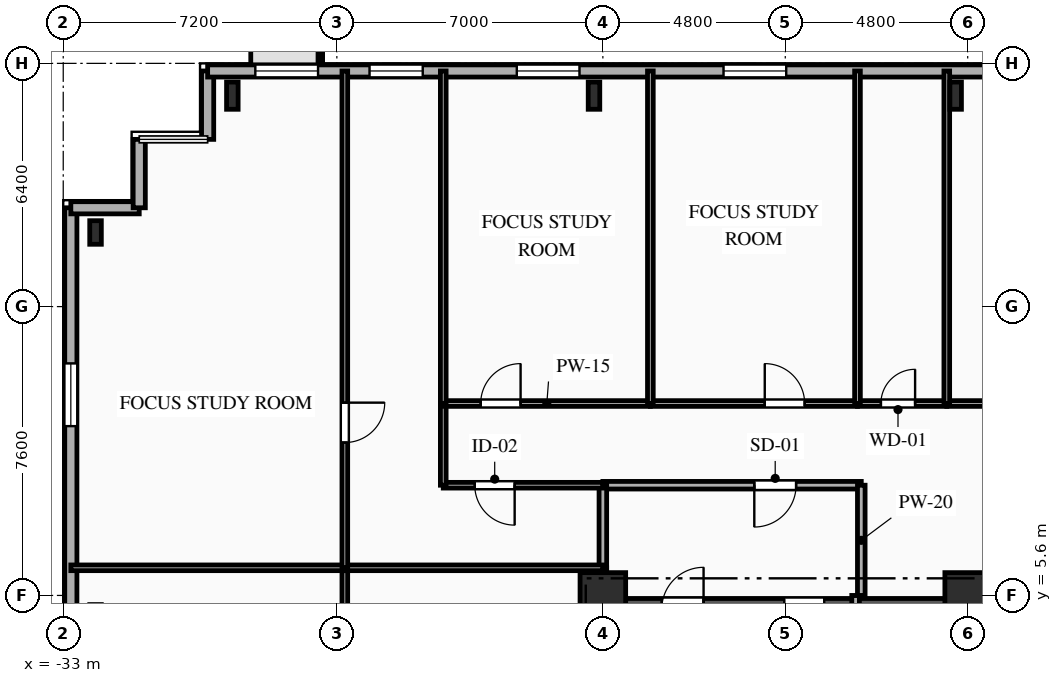
"""IFC4 building model, lengths in metres.
Left out: names, types, materials, properties, quantities, classifications, styles, units other than length and angle.
Written with IfcOpenShell. Run it as: python <this file> out.ifc"""

import sys

from ifc_helpers import new_model, si_unit, direction, frame, frame_2d, origin, origin_2d, place, context, subcontext, project, spatial, rectangle, i_section, extrude, element, fill, save


model = new_model("IFC4")
c1 = context("Model", 3, precision=1e-05, world=origin(), true_north=direction((0.0, 1.0)))
c2 = subcontext(c1, "Body", "Model", "MODEL_VIEW")
j1 = project(units=[si_unit("LENGTHUNIT", "METRE"), si_unit("PLANEANGLEUNIT", "RADIAN")], contexts=[c1])
p1 = place(None, origin())
s1 = spatial("IfcSite", under=j1, at=p1, CompositionType="ELEMENT")
p2 = place(p1, origin())
s2 = spatial("IfcBuilding", under=s1, at=p2, CompositionType="ELEMENT")
p3 = place(p2, frame((0.0, 0.0, 63.85)))
s3 = spatial("IfcBuildingStorey", under=s2, at=p3, CompositionType="ELEMENT", Elevation=63.85)
for number, where, z_axis, x_axis in (
    (1, (-18.8, 5.6, 0.0), (0.0, 0.0, 1.0), (1.0, 0.0, 0.0)),
    (2, (-9.2, 5.6, 0.0), (0.0, 0.0, 1.0), (1.0, 0.0, 0.0)),
):
    element("IfcColumn", number, at=place(p3, frame(where, z_axis=z_axis, x_axis=x_axis)), inside=s3, PredefinedType="COLUMN", context=c2, shape_type="SweptSolid", body=[
        extrude(rectangle(XDim=1.2, YDim=1.2, at=origin_2d()), origin(), (0.0, 0.0, 1.0), 3.35),
    ])
for number, where, z_axis, x_axis in (
    (3, (-9.517, 18.75, 0.0), (0.0, 0.0, 1.0), (1.0, 0.0, 0.0)),
    (4, (-19.033, 18.75, 0.0), (0.0, 0.0, 1.0), (1.0, 0.0, 0.0)),
    (5, (-28.55, 18.75, 0.0), (0.0, 0.0, 1.0), (1.0, 0.0, 0.0)),
):
    element("IfcColumn", number, at=place(p3, frame(where, z_axis=z_axis, x_axis=x_axis)), inside=s3, PredefinedType="COLUMN", context=c2, shape_type="SweptSolid", body=[
        extrude(i_section(OverallWidth=0.304, OverallDepth=0.716, WebThickness=0.021, FlangeThickness=0.04, FilletRadius=0.027, at=origin_2d()), origin(), (0.0, 0.0, 1.0), 3.35),
    ])
p4 = place(p3, frame((-32.15, 15.15, 0.0), z_axis=(0.0, 0.0, 1.0), x_axis=(1.0, 0.0, 0.0)))
e6 = element("IfcColumn", 6, at=p4, inside=s3, PredefinedType="COLUMN", context=c2, shape_type="SweptSolid", body=[
    extrude(i_section(OverallWidth=0.305, OverallDepth=0.62, WebThickness=0.021, FlangeThickness=0.04, FilletRadius=0.027, at=origin_2d()), origin(), (0.0, 0.0, 1.0), 3.35),
])
p5 = place(p3, frame((-32.8, -15.8, 0.0), z_axis=(0.0, 0.0, 1.0), x_axis=(0.0, 1.0, 0.0)))
e7 = element("IfcWall", 7, at=p5, inside=s3, PredefinedType="SOLIDWALL", context=c2, shape_type="SweptSolid", body=[
    extrude(rectangle(XDim=31.6, YDim=0.32, at=frame_2d((15.8, 0.0))), origin(), (0.0, 0.0, 1.0), 3.035),
])
p6 = place(p5, frame((4.175, 0.0, 0.85)))
e8 = element("IfcOpeningElement", 8, at=p6, cuts=e7, PredefinedType="OPENING", context=c2, shape_type="SweptSolid", body=[
    extrude(rectangle(XDim=1.65, YDim=1.85, at=frame_2d((0.825, 0.925))), frame((0.0, 0.17, 0.0), z_axis=(0.0, -1.0, 0.0), x_axis=(1.0, 0.0, 0.0)), (0.0, 0.0, 1.0), 0.34),
])
p7 = place(p5, frame((15.015, 0.0, 0.85)))
e9 = element("IfcOpeningElement", 9, at=p7, cuts=e7, PredefinedType="OPENING", context=c2, shape_type="SweptSolid", body=[
    extrude(rectangle(XDim=1.65, YDim=1.85, at=frame_2d((0.825, 0.925))), frame((0.0, 0.17, 0.0), z_axis=(0.0, -1.0, 0.0), x_axis=(1.0, 0.0, 0.0)), (0.0, 0.0, 1.0), 0.34),
])
p8 = place(p5, frame((25.855, 0.0, 0.85)))
e10 = element("IfcOpeningElement", 10, at=p8, cuts=e7, PredefinedType="OPENING", context=c2, shape_type="SweptSolid", body=[
    extrude(rectangle(XDim=1.65, YDim=1.85, at=frame_2d((0.825, 0.925))), frame((0.0, 0.17, 0.0), z_axis=(0.0, -1.0, 0.0), x_axis=(1.0, 0.0, 0.0)), (0.0, 0.0, 1.0), 0.34),
])
for number, where, z_axis, x_axis in (
    (11, (-32.8, 15.8, 0.0), (0.0, 0.0, 1.0), (1.0, 0.0, 0.0)),
    (12, (-31.0, 15.8, 0.0), (0.0, 0.0, 1.0), (0.0, 1.0, 0.0)),
):
    element("IfcWall", number, at=place(p3, frame(where, z_axis=z_axis, x_axis=x_axis)), inside=s3, PredefinedType="SOLIDWALL", context=c2, shape_type="SweptSolid", body=[
        extrude(rectangle(XDim=1.8, YDim=0.32, at=frame_2d((0.9, 0.0))), origin(), (0.0, 0.0, 1.0), 3.035),
    ])
p9 = place(p3, frame((-29.2, 17.6, 0.0), z_axis=(0.0, 0.0, 1.0), x_axis=(0.0, 1.0, 0.0)))
e13 = element("IfcWall", 13, at=p9, inside=s3, PredefinedType="SOLIDWALL", context=c2, shape_type="SweptSolid", body=[
    extrude(rectangle(XDim=1.8, YDim=0.32, at=frame_2d((0.9, 0.0))), origin(), (0.0, 0.0, 1.0), 3.035),
])
p10 = place(p3, frame((-29.2, 19.4, 0.0), z_axis=(0.0, 0.0, 1.0), x_axis=(1.0, 0.0, 0.0)))
e14 = element("IfcWall", 14, at=p10, inside=s3, PredefinedType="SOLIDWALL", context=c2, shape_type="SweptSolid", body=[
    extrude(rectangle(XDim=58.4, YDim=0.32, at=frame_2d((29.2, 0.0))), origin(), (0.0, 0.0, 1.0), 3.035),
])
p11 = place(p10, frame((1.255, 0.0, 0.85)))
e15 = element("IfcOpeningElement", 15, at=p11, cuts=e14, PredefinedType="OPENING", context=c2, shape_type="SweptSolid", body=[
    extrude(rectangle(XDim=1.65, YDim=1.85, at=frame_2d((0.825, 0.925))), frame((0.0, 0.17, 0.0), z_axis=(0.0, -1.0, 0.0), x_axis=(1.0, 0.0, 0.0)), (0.0, 0.0, 1.0), 0.34),
])
p12 = place(p10, frame((4.26, 0.0, 0.85)))
e16 = element("IfcOpeningElement", 16, at=p12, cuts=e14, PredefinedType="OPENING", context=c2, shape_type="SweptSolid", body=[
    extrude(rectangle(XDim=1.4, YDim=1.85, at=frame_2d((0.7, 0.925))), frame((0.0, 0.17, 0.0), z_axis=(0.0, -1.0, 0.0), x_axis=(1.0, 0.0, 0.0)), (0.0, 0.0, 1.0), 0.34),
])
p13 = place(p10, frame((8.135, 0.0, 0.85)))
e17 = element("IfcOpeningElement", 17, at=p13, cuts=e14, PredefinedType="OPENING", context=c2, shape_type="SweptSolid", body=[
    extrude(rectangle(XDim=1.65, YDim=1.85, at=frame_2d((0.825, 0.925))), frame((0.0, 0.17, 0.0), z_axis=(0.0, -1.0, 0.0), x_axis=(1.0, 0.0, 0.0)), (0.0, 0.0, 1.0), 0.34),
])
p14 = place(p10, frame((13.575, 0.0, 0.85)))
e18 = element("IfcOpeningElement", 18, at=p14, cuts=e14, PredefinedType="OPENING", context=c2, shape_type="SweptSolid", body=[
    extrude(rectangle(XDim=1.65, YDim=1.85, at=frame_2d((0.825, 0.925))), frame((0.0, 0.17, 0.0), z_axis=(0.0, -1.0, 0.0), x_axis=(1.0, 0.0, 0.0)), (0.0, 0.0, 1.0), 0.34),
])
p15 = place(p10, frame((23.28, 0.0, 0.85)))
e19 = element("IfcOpeningElement", 19, at=p15, cuts=e14, PredefinedType="OPENING", context=c2, shape_type="SweptSolid", body=[
    extrude(rectangle(XDim=1.6, YDim=1.85, at=frame_2d((0.8, 0.925))), frame((0.0, 0.17, 0.0), z_axis=(0.0, -1.0, 0.0), x_axis=(1.0, 0.0, 0.0)), (0.0, 0.0, 1.0), 0.34),
])
p16 = place(p10, frame((33.3, 0.0, 0.85)))
e20 = element("IfcOpeningElement", 20, at=p16, cuts=e14, PredefinedType="OPENING", context=c2, shape_type="SweptSolid", body=[
    extrude(rectangle(XDim=2.2, YDim=1.85, at=frame_2d((1.1, 0.925))), frame((0.0, 0.17, 0.0), z_axis=(0.0, -1.0, 0.0), x_axis=(1.0, 0.0, 0.0)), (0.0, 0.0, 1.0), 0.34),
])
p17 = place(p10, frame((42.335, 0.0, 0.85)))
e21 = element("IfcOpeningElement", 21, at=p17, cuts=e14, PredefinedType="OPENING", context=c2, shape_type="SweptSolid", body=[
    extrude(rectangle(XDim=1.65, YDim=1.85, at=frame_2d((0.825, 0.925))), frame((0.0, 0.17, 0.0), z_axis=(0.0, -1.0, 0.0), x_axis=(1.0, 0.0, 0.0)), (0.0, 0.0, 1.0), 0.34),
])
p18 = place(p10, frame((48.905, 0.0, 0.85)))
e22 = element("IfcOpeningElement", 22, at=p18, cuts=e14, PredefinedType="OPENING", context=c2, shape_type="SweptSolid", body=[
    extrude(rectangle(XDim=1.65, YDim=1.85, at=frame_2d((0.825, 0.925))), frame((0.0, 0.17, 0.0), z_axis=(0.0, -1.0, 0.0), x_axis=(1.0, 0.0, 0.0)), (0.0, 0.0, 1.0), 0.34),
])
p19 = place(p10, frame((54.32, 0.0, 0.85)))
e23 = element("IfcOpeningElement", 23, at=p19, cuts=e14, PredefinedType="OPENING", context=c2, shape_type="SweptSolid", body=[
    extrude(rectangle(XDim=1.6, YDim=1.85, at=frame_2d((0.8, 0.925))), frame((0.0, 0.17, 0.0), z_axis=(0.0, -1.0, 0.0), x_axis=(1.0, 0.0, 0.0)), (0.0, 0.0, 1.0), 0.34),
])
p20 = place(p3, frame((-18.8, 5.24, 0.0), z_axis=(0.0, 0.0, 1.0), x_axis=(1.0, 0.0, 0.0)))
e24 = element("IfcWall", 24, at=p20, inside=s3, PredefinedType="SHEAR", context=c2, shape_type="SweptSolid", body=[
    extrude(rectangle(XDim=9.6, YDim=0.56, at=frame_2d((4.8, 0.0))), origin(), (0.0, 0.0, 1.0), 3.035),
])
p21 = place(p20, frame((1.55, 0.0, 0.0)))
e25 = element("IfcOpeningElement", 25, at=p21, cuts=e24, PredefinedType="OPENING", context=c2, shape_type="SweptSolid", body=[
    extrude(rectangle(XDim=1.1, YDim=2.15, at=frame_2d((0.55, 1.075))), frame((0.0, 0.29, 0.0), z_axis=(0.0, -1.0, 0.0), x_axis=(1.0, 0.0, 0.0)), (0.0, 0.0, 1.0), 0.58),
])
p22 = place(p20, frame((4.775, 0.0, 0.0)))
e26 = element("IfcOpeningElement", 26, at=p22, cuts=e24, PredefinedType="OPENING", context=c2, shape_type="SweptSolid", body=[
    extrude(rectangle(XDim=1.05, YDim=2.1, at=frame_2d((0.525, 1.05))), frame((0.0, 0.29, 0.0), z_axis=(0.0, -1.0, 0.0), x_axis=(1.0, 0.0, 0.0)), (0.0, 0.0, 1.0), 0.58),
])
p23 = place(p3, frame((-12.15, 3.6, 0.0), z_axis=(0.0, 0.0, 1.0), x_axis=(0.0, 1.0, 0.0)))
e27 = element("IfcWall", 27, at=p23, inside=s3, PredefinedType="PARTITIONING", context=c2, shape_type="SweptSolid", body=[
    extrude(rectangle(XDim=2.0, YDim=0.2, at=frame_2d((1.0, 0.0))), origin(), (0.0, 0.0, 1.0), 3.035),
])
p24 = place(p3, frame((-12.0, 8.5, 0.0), z_axis=(0.0, 0.0, 1.0), x_axis=(-1.0, 0.0, 0.0)))
e28 = element("IfcWall", 28, at=p24, inside=s3, PredefinedType="PARTITIONING", context=c2, shape_type="SweptSolid", body=[
    extrude(rectangle(XDim=6.8, YDim=0.2, at=frame_2d((3.4, 0.0))), origin(), (0.0, 0.0, 1.0), 3.035),
])
p25 = place(p24, frame((1.715, 0.0, 0.0)))
e29 = element("IfcOpeningElement", 29, at=p25, cuts=e28, PredefinedType="OPENING", context=c2, shape_type="SweptSolid", body=[
    extrude(rectangle(XDim=1.1, YDim=2.15, at=frame_2d((0.55, 1.075))), frame((0.0, 0.11, 0.0), z_axis=(0.0, -1.0, 0.0), x_axis=(1.0, 0.0, 0.0)), (0.0, 0.0, 1.0), 0.22),
])
p26 = place(p3, frame((-12.0, 5.6, 0.0), z_axis=(0.0, 0.0, 1.0), x_axis=(0.0, 1.0, 0.0)))
e30 = element("IfcWall", 30, at=p26, inside=s3, PredefinedType="PARTITIONING", context=c2, shape_type="SweptSolid", body=[
    extrude(rectangle(XDim=2.9, YDim=0.2, at=frame_2d((1.45, 0.0))), origin(), (0.0, 0.0, 1.0), 3.035),
])
p27 = place(p3, frame((-18.8, 6.327, 0.0), z_axis=(0.0, 0.0, 1.0), x_axis=(0.0, -1.0, 0.0)))
e31 = element("IfcWall", 31, at=p27, inside=s3, PredefinedType="PARTITIONING", context=c2, shape_type="SweptSolid", body=[
    extrude(rectangle(XDim=0.727, YDim=0.2, at=frame_2d((0.363, 0.0))), origin(), (0.0, 0.0, 1.0), 2.52),
])
p28 = place(p3, frame((-18.8, 8.5, 0.0), z_axis=(0.0, 0.0, 1.0), x_axis=(0.0, -1.0, 0.0)))
e32 = element("IfcWall", 32, at=p28, inside=s3, PredefinedType="PARTITIONING", context=c2, shape_type="SweptSolid", body=[
    extrude(rectangle(XDim=2.173, YDim=0.2, at=frame_2d((1.086, 0.0))), origin(), (0.0, 0.0, 1.0), 2.52),
])
p29 = place(p3, frame((-18.8, 8.5, 0.0), z_axis=(0.0, 0.0, 1.0), x_axis=(-1.0, 0.0, 0.0)))
e33 = element("IfcWall", 33, at=p29, inside=s3, PredefinedType="PARTITIONING", context=c2, shape_type="SweptSolid", body=[
    extrude(rectangle(XDim=4.2, YDim=0.15, at=frame_2d((2.1, 0.0))), origin(), (0.0, 0.0, 1.0), 3.035),
])
p30 = place(p29, frame((2.321, 0.0, 0.0)))
e34 = element("IfcOpeningElement", 34, at=p30, cuts=e33, PredefinedType="OPENING", context=c2, shape_type="SweptSolid", body=[
    extrude(rectangle(XDim=1.05, YDim=2.15, at=frame_2d((0.525, 1.075))), frame((0.0, 0.085, 0.0), z_axis=(0.0, -1.0, 0.0), x_axis=(1.0, 0.0, 0.0)), (0.0, 0.0, 1.0), 0.17),
])
p31 = place(p3, frame((-23.0, 8.5, 0.0), z_axis=(0.0, 0.0, 1.0), x_axis=(0.0, 1.0, 0.0)))
e35 = element("IfcWall", 35, at=p31, inside=s3, PredefinedType="PARTITIONING", context=c2, shape_type="SweptSolid", body=[
    extrude(rectangle(XDim=2.15, YDim=0.15, at=frame_2d((1.075, 0.0))), origin(), (0.0, 0.0, 1.0), 3.035),
])
p32 = place(p3, frame((-23.0, 10.65, 0.0), z_axis=(0.0, 0.0, 1.0), x_axis=(1.0, 0.0, 0.0)))
e36 = element("IfcWall", 36, at=p32, inside=s3, PredefinedType="PARTITIONING", context=c2, shape_type="SweptSolid", body=[
    extrude(rectangle(XDim=5.45, YDim=0.15, at=frame_2d((2.725, 0.0))), origin(), (0.0, 0.0, 1.0), 3.035),
])
p33 = place(p32, frame((0.985, 0.0, 0.0)))
e37 = element("IfcOpeningElement", 37, at=p33, cuts=e36, PredefinedType="OPENING", context=c2, shape_type="SweptSolid", body=[
    extrude(rectangle(XDim=1.05, YDim=2.15, at=frame_2d((0.525, 1.075))), frame((0.0, 0.085, 0.0), z_axis=(0.0, -1.0, 0.0), x_axis=(1.0, 0.0, 0.0)), (0.0, 0.0, 1.0), 0.17),
])
p34 = place(p3, frame((-17.55, 10.65, 0.0), z_axis=(0.0, 0.0, 1.0), x_axis=(1.0, 0.0, 0.0)))
e38 = element("IfcWall", 38, at=p34, inside=s3, PredefinedType="PARTITIONING", context=c2, shape_type="SweptSolid", body=[
    extrude(rectangle(XDim=5.45, YDim=0.15, at=frame_2d((2.725, 0.0))), origin(), (0.0, 0.0, 1.0), 3.035),
])
p35 = place(p34, frame((3.01, 0.0, 0.0)))
e39 = element("IfcOpeningElement", 39, at=p35, cuts=e38, PredefinedType="OPENING", context=c2, shape_type="SweptSolid", body=[
    extrude(rectangle(XDim=1.05, YDim=2.15, at=frame_2d((0.525, 1.075))), frame((0.0, 0.085, 0.0), z_axis=(0.0, -1.0, 0.0), x_axis=(1.0, 0.0, 0.0)), (0.0, 0.0, 1.0), 0.17),
])
p36 = place(p3, frame((-12.1, 10.65, 0.0), z_axis=(0.0, 0.0, 1.0), x_axis=(1.0, 0.0, 0.0)))
e40 = element("IfcWall", 40, at=p36, inside=s3, PredefinedType="PLUMBINGWALL", context=c2, shape_type="SweptSolid", body=[
    extrude(rectangle(XDim=2.35, YDim=0.15, at=frame_2d((1.175, 0.0))), origin(), (0.0, 0.0, 1.0), 3.035),
])
p37 = place(p36, frame((0.616, 0.0, 0.0)))
e41 = element("IfcOpeningElement", 41, at=p37, cuts=e40, PredefinedType="OPENING", context=c2, shape_type="SweptSolid", body=[
    extrude(rectangle(XDim=0.9, YDim=2.1, at=frame_2d((0.45, 1.05))), frame((0.0, 0.085, 0.0), z_axis=(0.0, -1.0, 0.0), x_axis=(1.0, 0.0, 0.0)), (0.0, 0.0, 1.0), 0.17),
])
p38 = place(p3, frame((-9.75, 10.65, 0.0), z_axis=(0.0, 0.0, 1.0), x_axis=(1.0, 0.0, 0.0)))
e42 = element("IfcWall", 42, at=p38, inside=s3, PredefinedType="PARTITIONING", context=c2, shape_type="SweptSolid", body=[
    extrude(rectangle(XDim=9.15, YDim=0.15, at=frame_2d((4.575, 0.0))), origin(), (0.0, 0.0, 1.0), 3.035),
])
p39 = place(p38, frame((6.74, 0.0, 0.0)))
e43 = element("IfcOpeningElement", 43, at=p39, cuts=e42, PredefinedType="OPENING", context=c2, shape_type="SweptSolid", body=[
    extrude(rectangle(XDim=0.95, YDim=2.1, at=frame_2d((0.475, 1.05))), frame((0.0, 0.085, 0.0), z_axis=(0.0, -1.0, 0.0), x_axis=(1.0, 0.0, 0.0)), (0.0, 0.0, 1.0), 0.17),
])
p40 = place(p3, frame((-25.59, 6.327, 0.0), z_axis=(0.0, 0.0, 1.0), x_axis=(0.0, -1.0, 0.0)))
e44 = element("IfcWall", 44, at=p40, inside=s3, PredefinedType="PARTITIONING", context=c2, shape_type="SweptSolid", body=[
    extrude(rectangle(XDim=12.654, YDim=0.15, at=frame_2d((6.327, 0.0))), origin(), (0.0, 0.0, 1.0), 2.69),
])
p41 = place(p40, frame((5.802, 0.0, 0.0)))
e45 = element("IfcOpeningElement", 45, at=p41, cuts=e44, PredefinedType="OPENING", context=c2, shape_type="SweptSolid", body=[
    extrude(rectangle(XDim=1.05, YDim=2.15, at=frame_2d((0.525, 1.075))), frame((0.0, 0.085, 0.0), z_axis=(0.0, -1.0, 0.0), x_axis=(1.0, 0.0, 0.0)), (0.0, 0.0, 1.0), 0.17),
])
p42 = place(p3, frame((-32.8, 6.327, 0.0), z_axis=(0.0, 0.0, 1.0), x_axis=(1.0, 0.0, 0.0)))
e46 = element("IfcWall", 46, at=p42, inside=s3, PredefinedType="PARTITIONING", context=c2, shape_type="SweptSolid", body=[
    extrude(rectangle(XDim=7.21, YDim=0.15, at=frame_2d((3.605, 0.0))), origin(), (0.0, 0.0, 1.0), 3.035),
])
p43 = place(p3, frame((-25.59, 6.327, 0.0), z_axis=(0.0, 0.0, 1.0), x_axis=(1.0, 0.0, 0.0)))
e47 = element("IfcWall", 47, at=p43, inside=s3, PredefinedType="PARTITIONING", context=c2, shape_type="SweptSolid", body=[
    extrude(rectangle(XDim=6.79, YDim=0.15, at=frame_2d((3.395, 0.0))), origin(), (0.0, 0.0, 1.0), 3.035),
])
p44 = place(p3, frame((-25.59, 19.4, 0.0), z_axis=(0.0, 0.0, 1.0), x_axis=(0.0, -1.0, 0.0)))
e48 = element("IfcWall", 48, at=p44, inside=s3, PredefinedType="PARTITIONING", context=c2, shape_type="SweptSolid", body=[
    extrude(rectangle(XDim=13.073, YDim=0.15, at=frame_2d((6.537, 0.0))), origin(), (0.0, 0.0, 1.0), 2.69),
])
p45 = place(p44, frame((8.727, 0.0, 0.0)))
e49 = element("IfcOpeningElement", 49, at=p45, cuts=e48, PredefinedType="OPENING", context=c2, shape_type="SweptSolid", body=[
    extrude(rectangle(XDim=1.05, YDim=2.15, at=frame_2d((0.525, 1.075))), frame((0.0, 0.085, 0.0), z_axis=(0.0, -1.0, 0.0), x_axis=(1.0, 0.0, 0.0)), (0.0, 0.0, 1.0), 0.17),
])
for number, where, z_axis, x_axis in (
    (50, (-23.0, 19.4, 0.0), (0.0, 0.0, 1.0), (0.0, -1.0, 0.0)),
    (51, (-17.55, 19.4, 0.0), (0.0, 0.0, 1.0), (0.0, -1.0, 0.0)),
):
    element("IfcWall", number, at=place(p3, frame(where, z_axis=z_axis, x_axis=x_axis)), inside=s3, PredefinedType="PARTITIONING", context=c2, shape_type="SweptSolid", body=[
        extrude(rectangle(XDim=8.75, YDim=0.15, at=frame_2d((4.375, 0.0))), origin(), (0.0, 0.0, 1.0), 3.035),
    ])
for number, where, z_axis, x_axis in (
    (52, (-12.1, 19.4, 0.0), (0.0, 0.0, 1.0), (0.0, -1.0, 0.0)),
    (53, (-9.75, 19.4, 0.0), (0.0, 0.0, 1.0), (0.0, -1.0, 0.0)),
):
    element("IfcWall", number, at=place(p3, frame(where, z_axis=z_axis, x_axis=x_axis)), inside=s3, PredefinedType="PLUMBINGWALL", context=c2, shape_type="SweptSolid", body=[
        extrude(rectangle(XDim=8.75, YDim=0.15, at=frame_2d((4.375, 0.0))), origin(), (0.0, 0.0, 1.0), 3.035),
    ])
p46 = place(p8, origin())
e54 = element("IfcWindow", 54, at=p46, inside=s3, PartitioningType="SINGLE_PANEL", PredefinedType="WINDOW", context=c2, shape_type="SweptSolid", body=[
    extrude(rectangle(XDim=1.65, YDim=1.85, at=frame_2d((0.825, 0.925))), frame((0.0, 0.03, 0.0), z_axis=(0.0, -1.0, 0.0), x_axis=(1.0, 0.0, 0.0)), (0.0, 0.0, 1.0), 0.06),
])
fill(e10, e54)
p47 = place(p11, origin())
e55 = element("IfcWindow", 55, at=p47, inside=s3, PartitioningType="SINGLE_PANEL", PredefinedType="WINDOW", context=c2, shape_type="SweptSolid", body=[
    extrude(rectangle(XDim=1.65, YDim=1.85, at=frame_2d((0.825, 0.925))), frame((0.0, 0.03, 0.0), z_axis=(0.0, -1.0, 0.0), x_axis=(1.0, 0.0, 0.0)), (0.0, 0.0, 1.0), 0.06),
])
fill(e15, e55)
p48 = place(p12, origin())
e56 = element("IfcWindow", 56, at=p48, inside=s3, PartitioningType="SINGLE_PANEL", PredefinedType="WINDOW", context=c2, shape_type="SweptSolid", body=[
    extrude(rectangle(XDim=1.4, YDim=1.85, at=frame_2d((0.7, 0.925))), frame((0.0, 0.03, 0.0), z_axis=(0.0, -1.0, 0.0), x_axis=(1.0, 0.0, 0.0)), (0.0, 0.0, 1.0), 0.06),
])
fill(e16, e56)
p49 = place(p13, origin())
e57 = element("IfcWindow", 57, at=p49, inside=s3, PartitioningType="SINGLE_PANEL", PredefinedType="WINDOW", context=c2, shape_type="SweptSolid", body=[
    extrude(rectangle(XDim=1.65, YDim=1.85, at=frame_2d((0.825, 0.925))), frame((0.0, 0.03, 0.0), z_axis=(0.0, -1.0, 0.0), x_axis=(1.0, 0.0, 0.0)), (0.0, 0.0, 1.0), 0.06),
])
fill(e17, e57)
p50 = place(p14, origin())
e58 = element("IfcWindow", 58, at=p50, inside=s3, PartitioningType="SINGLE_PANEL", PredefinedType="WINDOW", context=c2, shape_type="SweptSolid", body=[
    extrude(rectangle(XDim=1.65, YDim=1.85, at=frame_2d((0.825, 0.925))), frame((0.0, 0.03, 0.0), z_axis=(0.0, -1.0, 0.0), x_axis=(1.0, 0.0, 0.0)), (0.0, 0.0, 1.0), 0.06),
])
fill(e18, e58)
p51 = place(p25, origin())
e59 = element("IfcDoor", 59, at=p51, inside=s3, OperationType="SINGLE_SWING_RIGHT", PredefinedType="DOOR", context=c2, shape_type="SweptSolid", body=[
    extrude(rectangle(XDim=1.1, YDim=2.15, at=frame_2d((0.55, 1.075))), frame((0.0, 0.025, 0.0), z_axis=(0.0, -1.0, 0.0), x_axis=(1.0, 0.0, 0.0)), (0.0, 0.0, 1.0), 0.05),
])
fill(e29, e59)
p52 = place(p30, origin())
e60 = element("IfcDoor", 60, at=p52, inside=s3, OperationType="SINGLE_SWING_LEFT", PredefinedType="DOOR", context=c2, shape_type="SweptSolid", body=[
    extrude(rectangle(XDim=1.05, YDim=2.15, at=frame_2d((0.525, 1.075))), frame((0.0, 0.025, 0.0), z_axis=(0.0, -1.0, 0.0), x_axis=(1.0, 0.0, 0.0)), (0.0, 0.0, 1.0), 0.05),
])
fill(e34, e60)
p53 = place(p33, origin())
e61 = element("IfcDoor", 61, at=p53, inside=s3, OperationType="SINGLE_SWING_RIGHT", PredefinedType="DOOR", context=c2, shape_type="SweptSolid", body=[
    extrude(rectangle(XDim=1.05, YDim=2.15, at=frame_2d((0.525, 1.075))), frame((0.0, 0.025, 0.0), z_axis=(0.0, -1.0, 0.0), x_axis=(1.0, 0.0, 0.0)), (0.0, 0.0, 1.0), 0.05),
])
fill(e37, e61)
p54 = place(p35, origin())
e62 = element("IfcDoor", 62, at=p54, inside=s3, OperationType="SINGLE_SWING_LEFT", PredefinedType="DOOR", context=c2, shape_type="SweptSolid", body=[
    extrude(rectangle(XDim=1.05, YDim=2.15, at=frame_2d((0.525, 1.075))), frame((0.0, 0.025, 0.0), z_axis=(0.0, -1.0, 0.0), x_axis=(1.0, 0.0, 0.0)), (0.0, 0.0, 1.0), 0.05),
])
fill(e39, e62)
p55 = place(p37, origin())
e63 = element("IfcDoor", 63, at=p55, inside=s3, OperationType="SINGLE_SWING_RIGHT", PredefinedType="DOOR", context=c2, shape_type="SweptSolid", body=[
    extrude(rectangle(XDim=0.9, YDim=2.1, at=frame_2d((0.45, 1.05))), frame((0.0, 0.025, 0.0), z_axis=(0.0, -1.0, 0.0), x_axis=(1.0, 0.0, 0.0)), (0.0, 0.0, 1.0), 0.05),
])
fill(e41, e63)
p56 = place(p45, origin())
e64 = element("IfcDoor", 64, at=p56, inside=s3, OperationType="SINGLE_SWING_LEFT", PredefinedType="DOOR", context=c2, shape_type="SweptSolid", body=[
    extrude(rectangle(XDim=1.05, YDim=2.15, at=frame_2d((0.525, 1.075))), frame((0.0, 0.025, 0.0), z_axis=(0.0, -1.0, 0.0), x_axis=(1.0, 0.0, 0.0)), (0.0, 0.0, 1.0), 0.05),
])
fill(e49, e64)
save(model, sys.argv[1])
